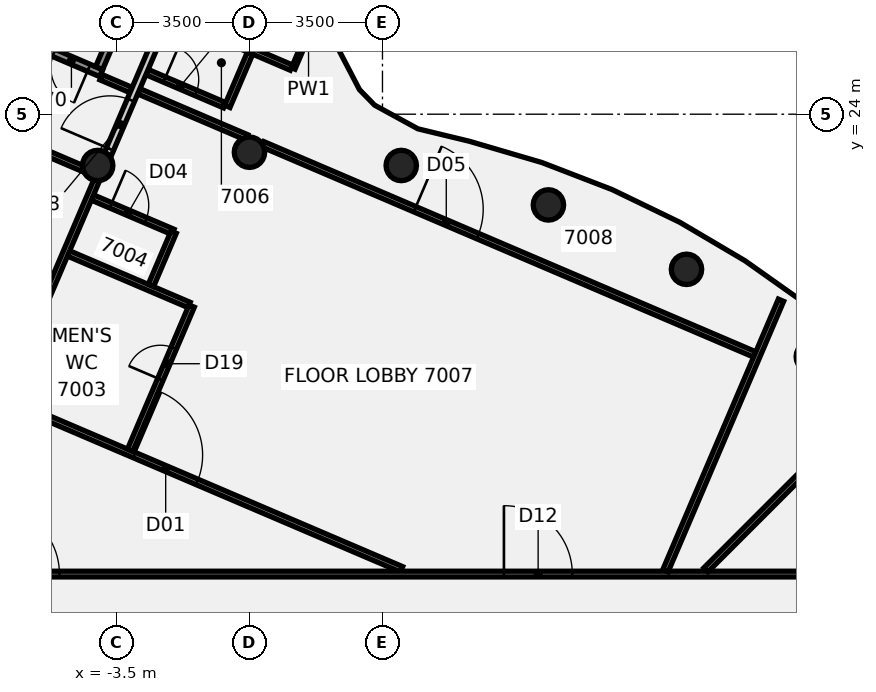
"""IFC4 building model, lengths in metres.
Left out: names, types, materials, properties, quantities, classifications, styles, units other than length and angle.
Written with IfcOpenShell. Run it as: python <this file> out.ifc"""

import sys

from ifc_helpers import new_model, si_unit, direction, frame, frame_2d, origin, origin_2d, place, context, subcontext, project, spatial, rectangle, circle, extrude, element, fill, save


model = new_model("IFC4")
c1 = context("Model", 3, precision=1e-05, world=origin(), true_north=direction((0.0, 1.0)))
c2 = subcontext(c1, "Body", "Model", "MODEL_VIEW")
j1 = project(units=[si_unit("LENGTHUNIT", "METRE"), si_unit("PLANEANGLEUNIT", "RADIAN")], contexts=[c1])
p1 = place(None, origin())
s1 = spatial("IfcSite", under=j1, at=p1, CompositionType="ELEMENT")
p2 = place(p1, origin())
s2 = spatial("IfcBuilding", under=s1, at=p2, CompositionType="ELEMENT")
p3 = place(p2, frame((0.0, 0.0, 274.8)))
s3 = spatial("IfcBuildingStorey", under=s2, at=p3, CompositionType="ELEMENT", Elevation=274.8)
for number, where, z_axis, x_axis in (
    (1, (11.5, 19.919, -0.14), (0.0, 0.0, 1.0), (1.0, 0.0, 0.0)),
    (2, (7.866, 21.613, -0.14), (0.0, 0.0, 1.0), (1.0, 0.0, 0.0)),
    (3, (3.994, 22.651, -0.14), (0.0, 0.0, 1.0), (1.0, 0.0, 0.0)),
    (4, (0.0, 23.0, -0.14), (0.0, 0.0, 1.0), (1.0, 0.0, 0.0)),
    (5, (-3.994, 22.651, -0.14), (0.0, 0.0, 1.0), (1.0, 0.0, 0.0)),
):
    element("IfcColumn", number, at=place(p3, frame(where, z_axis=z_axis, x_axis=x_axis)), inside=s3, PredefinedType="COLUMN", context=c2, shape_type="SweptSolid", body=[
        extrude(circle(Radius=0.4, at=origin_2d()), origin(), (0.0, 0.0, 1.0), 3.56),
    ])
p4 = place(p3, frame((-15.911, 20.533, 0.0), z_axis=(0.0, 0.0, 1.0), x_axis=(0.919595802133, -0.392865830405, 0.0)))
e6 = element("IfcWall", 6, at=p4, inside=s3, PredefinedType="PARTITIONING", context=c2, shape_type="SweptSolid", body=[
    extrude(rectangle(XDim=21.654, YDim=0.15, at=frame_2d((10.827, 0.0))), origin(), (0.0, 0.0, 1.0), 2.824),
])
p5 = place(p4, frame((14.005, 0.0, 0.0)))
e7 = element("IfcOpeningElement", 7, at=p5, cuts=e6, PredefinedType="OPENING", context=c2, shape_type="SweptSolid", body=[
    extrude(rectangle(XDim=1.8, YDim=2.1, at=frame_2d((0.9, 1.05))), frame((0.0, 0.085, 0.0), z_axis=(0.0, -1.0, 0.0), x_axis=(1.0, 0.0, 0.0)), (0.0, 0.0, 1.0), 0.17),
])
p6 = place(p3, frame((-12.173, 25.896, 0.0), z_axis=(0.0, 0.0, 1.0), x_axis=(0.919645111199, -0.392750390767, 0.0)))
e8 = element("IfcWall", 8, at=p6, inside=s3, PredefinedType="PARTITIONING", context=c2, shape_type="SweptSolid", body=[
    extrude(rectangle(XDim=8.472, YDim=0.15, at=frame_2d((4.236, 0.0))), origin(), (0.0, 0.0, 1.0), 2.824),
])
p7 = place(p6, frame((3.925, 0.0, 0.0)))
e9 = element("IfcOpeningElement", 9, at=p7, cuts=e8, PredefinedType="OPENING", context=c2, shape_type="SweptSolid", body=[
    extrude(rectangle(XDim=0.9, YDim=2.1, at=frame_2d((0.45, 1.05))), frame((0.0, 0.085, 0.0), z_axis=(0.0, -1.0, 0.0), x_axis=(1.0, 0.0, 0.0)), (0.0, 0.0, 1.0), 0.17),
])
p8 = place(p3, frame((-3.906, 24.973, 0.0), z_axis=(0.0, 0.0, 1.0), x_axis=(0.919526501885, -0.393028004512, 0.0)))
e10 = element("IfcWall", 10, at=p8, inside=s3, PredefinedType="PARTITIONING", context=c2, shape_type="SweptSolid", body=[
    extrude(rectangle(XDim=0.86, YDim=0.15, at=frame_2d((0.43, 0.0))), origin(), (0.0, 0.0, 1.0), 2.824),
])
p9 = place(p3, frame((-4.761, 20.336, 0.0), z_axis=(0.0, 0.0, 1.0), x_axis=(0.91960570613, -0.392842646938, 0.0)))
e11 = element("IfcWall", 11, at=p9, inside=s3, PredefinedType="PARTITIONING", context=c2, shape_type="SweptSolid", body=[
    extrude(rectangle(XDim=3.449, YDim=0.15, at=frame_2d((1.725, 0.0))), origin(), (0.0, 0.0, 1.0), 2.824),
])
p10 = place(p3, frame((-4.128, 21.807, 0.0), z_axis=(0.0, 0.0, 1.0), x_axis=(0.919556307153, -0.392958264929, 0.0)))
e12 = element("IfcWall", 12, at=p10, inside=s3, PredefinedType="PARTITIONING", context=c2, shape_type="SweptSolid", body=[
    extrude(rectangle(XDim=2.3, YDim=0.15, at=frame_2d((1.15, 0.0))), origin(), (0.0, 0.0, 1.0), 2.824),
])
p11 = place(p10, frame((0.52, 0.0, 0.0)))
e13 = element("IfcOpeningElement", 13, at=p11, cuts=e12, PredefinedType="OPENING", context=c2, shape_type="SweptSolid", body=[
    extrude(rectangle(XDim=1.0, YDim=2.1, at=frame_2d((0.5, 1.05))), frame((0.0, 0.085, 0.0), z_axis=(0.0, -1.0, 0.0), x_axis=(1.0, 0.0, 0.0)), (0.0, 0.0, 1.0), 0.17),
])
p12 = place(p3, frame((-2.911, 24.603, 0.0), z_axis=(0.0, 0.0, 1.0), x_axis=(0.919582336427, -0.392897348593, 0.0)))
e14 = element("IfcWall", 14, at=p12, inside=s3, PredefinedType="PARTITIONING", context=c2, shape_type="SweptSolid", body=[
    extrude(rectangle(XDim=3.086, YDim=0.15, at=frame_2d((1.543, 0.0))), origin(), (0.0, 0.0, 1.0), 2.824),
])
p13 = place(p3, frame((0.351, 23.209, 0.0), z_axis=(0.0, 0.0, 1.0), x_axis=(0.919588500122, -0.392882922056, 0.0)))
e15 = element("IfcWall", 15, at=p13, inside=s3, PredefinedType="PARTITIONING", context=c2, shape_type="SweptSolid", body=[
    extrude(rectangle(XDim=14.077, YDim=0.15, at=frame_2d((7.038, 0.0))), origin(), (0.0, 0.0, 1.0), 2.824),
])
p14 = place(p13, frame((4.35, 0.0, 0.0)))
e16 = element("IfcOpeningElement", 16, at=p14, cuts=e15, PredefinedType="OPENING", context=c2, shape_type="SweptSolid", body=[
    extrude(rectangle(XDim=1.8, YDim=2.1, at=frame_2d((0.9, 1.05))), frame((0.0, 0.085, 0.0), z_axis=(0.0, -1.0, 0.0), x_axis=(1.0, 0.0, 0.0)), (0.0, 0.0, 1.0), 0.17),
])
p15 = place(p3, frame((-2.695, 25.109, 0.0), z_axis=(0.0, 0.0, 1.0), x_axis=(0.919571099673, -0.392923647349, 0.0)))
e17 = element("IfcWall", 17, at=p15, inside=s3, PredefinedType="PARTITIONING", context=c2, shape_type="SweptSolid", body=[
    extrude(rectangle(XDim=2.22, YDim=0.15, at=frame_2d((1.11, 0.0))), origin(), (0.0, 0.0, 1.0), 2.824),
])
p16 = place(p15, frame((0.5, 0.0, 0.0)))
e18 = element("IfcOpeningElement", 18, at=p16, cuts=e17, PredefinedType="OPENING", context=c2, shape_type="SweptSolid", body=[
    extrude(rectangle(XDim=0.9, YDim=2.1, at=frame_2d((0.45, 1.05))), frame((0.0, 0.085, 0.0), z_axis=(0.0, -1.0, 0.0), x_axis=(1.0, 0.0, 0.0)), (0.0, 0.0, 1.0), 0.17),
])
p17 = place(p3, frame((-2.062, 26.579, 0.0), z_axis=(0.0, 0.0, 1.0), x_axis=(0.919588532032, -0.392882847366, 0.0)))
e19 = element("IfcWall", 19, at=p17, inside=s3, PredefinedType="PARTITIONING", context=c2, shape_type="SweptSolid", body=[
    extrude(rectangle(XDim=3.441, YDim=0.15, at=frame_2d((1.72, 0.0))), origin(), (0.0, 0.0, 1.0), 2.824),
])
p18 = place(p3, frame((-17.065, 11.9, 0.0), z_axis=(0.0, 0.0, 1.0), x_axis=(1.0, 0.0, 0.0)))
e20 = element("IfcWall", 20, at=p18, inside=s3, PredefinedType="PARTITIONING", context=c2, shape_type="SweptSolid", body=[
    extrude(rectangle(XDim=34.165, YDim=0.15, at=frame_2d((17.083, 0.0))), origin(), (0.0, 0.0, 1.0), 2.824),
])
p19 = place(p18, frame((23.761, 0.0, 0.0)))
e21 = element("IfcOpeningElement", 21, at=p19, cuts=e20, PredefinedType="OPENING", context=c2, shape_type="SweptSolid", body=[
    extrude(rectangle(XDim=1.8, YDim=2.1, at=frame_2d((0.9, 1.05))), frame((0.0, 0.085, 0.0), z_axis=(0.0, -1.0, 0.0), x_axis=(1.0, 0.0, 0.0)), (0.0, 0.0, 1.0), 0.17),
])
p20 = place(p18, frame((1.615, 0.0, 0.0)))
e22 = element("IfcOpeningElement", 22, at=p20, cuts=e20, PredefinedType="OPENING", context=c2, shape_type="SweptSolid", body=[
    extrude(rectangle(XDim=0.9, YDim=2.1, at=frame_2d((0.45, 1.05))), frame((0.0, 0.085, 0.0), z_axis=(0.0, -1.0, 0.0), x_axis=(1.0, 0.0, 0.0)), (0.0, 0.0, 1.0), 0.17),
])
p21 = place(p18, frame((31.665, 0.0, 0.0)))
e23 = element("IfcOpeningElement", 23, at=p21, cuts=e20, PredefinedType="OPENING", context=c2, shape_type="SweptSolid", body=[
    extrude(rectangle(XDim=0.9, YDim=2.1, at=frame_2d((0.45, 1.05))), frame((0.0, 0.085, 0.0), z_axis=(0.0, -1.0, 0.0), x_axis=(1.0, 0.0, 0.0)), (0.0, 0.0, 1.0), 0.17),
])
p22 = place(p18, frame((10.265, 0.0, 0.0)))
e24 = element("IfcOpeningElement", 24, at=p22, cuts=e20, PredefinedType="OPENING", context=c2, shape_type="SweptSolid", body=[
    extrude(rectangle(XDim=1.8, YDim=2.1, at=frame_2d((0.9, 1.05))), frame((0.0, 0.085, 0.0), z_axis=(0.0, -1.0, 0.0), x_axis=(1.0, 0.0, 0.0)), (0.0, 0.0, 1.0), 0.17),
])
p23 = place(p3, frame((12.01, 12.01, 0.0), z_axis=(0.0, 0.0, 1.0), x_axis=(0.707106781187, 0.707106781187, 0.0)))
e25 = element("IfcWall", 25, at=p23, inside=s3, PredefinedType="PARTITIONING", context=c2, shape_type="SweptSolid", body=[
    extrude(rectangle(XDim=6.691, YDim=0.15, at=frame_2d((3.345, 0.0))), origin(), (0.0, 0.0, 1.0), 2.824),
])
p24 = place(p3, frame((-6.45, 16.573, 0.0), z_axis=(0.0, 0.0, 1.0), x_axis=(0.392889649243, 0.919585625985, 0.0)))
e26 = element("IfcWall", 26, at=p24, inside=s3, PredefinedType="PARTITIONING", context=c2, shape_type="SweptSolid", body=[
    extrude(rectangle(XDim=6.326, YDim=0.15, at=frame_2d((3.163, 0.0))), origin(), (0.0, 0.0, 1.0), 2.824),
])
p25 = place(p3, frame((-3.788, 22.804, 0.0), z_axis=(0.0, 0.0, 1.0), x_axis=(0.392862746148, 0.91959711977, 0.0)))
e27 = element("IfcWall", 27, at=p25, inside=s3, PredefinedType="PARTITIONING", context=c2, shape_type="SweptSolid", body=[
    extrude(rectangle(XDim=7.448, YDim=0.2, at=frame_2d((3.724, 0.0))), origin(), (0.0, 0.0, 1.0), 2.824),
])
p26 = place(p25, frame((0.303, 0.0, 0.0)))
e28 = element("IfcOpeningElement", 28, at=p26, cuts=e27, PredefinedType="OPENING", context=c2, shape_type="SweptSolid", body=[
    extrude(rectangle(XDim=1.4, YDim=2.1, at=frame_2d((0.7, 1.05))), frame((0.0, 0.11, 0.0), z_axis=(0.0, -1.0, 0.0), x_axis=(1.0, 0.0, 0.0)), (0.0, 0.0, 1.0), 0.22),
])
p27 = place(p3, frame((-3.14, 15.159, 0.0), z_axis=(0.0, 0.0, 1.0), x_axis=(0.392854606295, 0.919600597168, 0.0)))
e29 = element("IfcWall", 29, at=p27, inside=s3, PredefinedType="PARTITIONING", context=c2, shape_type="SweptSolid", body=[
    extrude(rectangle(XDim=4.125, YDim=0.15, at=frame_2d((2.062, 0.0))), origin(), (0.0, 0.0, 1.0), 2.824),
])
p28 = place(p27, frame((2.025, 0.0, 0.0)))
e30 = element("IfcOpeningElement", 30, at=p28, cuts=e29, PredefinedType="OPENING", context=c2, shape_type="SweptSolid", body=[
    extrude(rectangle(XDim=0.9, YDim=2.1, at=frame_2d((0.45, 1.05))), frame((0.0, 0.085, 0.0), z_axis=(0.0, -1.0, 0.0), x_axis=(1.0, 0.0, 0.0)), (0.0, 0.0, 1.0), 0.17),
])
p29 = place(p3, frame((1.152, 25.205, 0.0), z_axis=(0.0, 0.0, 1.0), x_axis=(0.392869839525, 0.919594089363, 0.0)))
e31 = element("IfcWall", 31, at=p29, inside=s3, PredefinedType="PARTITIONING", context=c2, shape_type="SweptSolid", body=[
    extrude(rectangle(XDim=2.05, YDim=0.1, at=frame_2d((1.025, 0.0))), origin(), (0.0, 0.0, 1.0), 2.824),
])
p30 = place(p29, frame((0.45, 0.0, 0.0)))
e32 = element("IfcOpeningElement", 32, at=p30, cuts=e31, PredefinedType="OPENING", context=c2, shape_type="SweptSolid", body=[
    extrude(rectangle(XDim=0.9, YDim=2.1, at=frame_2d((0.45, 1.05))), frame((0.0, 0.06, 0.0), z_axis=(0.0, -1.0, 0.0), x_axis=(1.0, 0.0, 0.0)), (0.0, 0.0, 1.0), 0.12),
])
p31 = place(p3, frame((-2.592, 19.497, 0.0), z_axis=(0.0, 0.0, 1.0), x_axis=(0.39231007283, 0.919833031999, 0.0)))
e33 = element("IfcWall", 33, at=p31, inside=s3, PredefinedType="PARTITIONING", context=c2, shape_type="SweptSolid", body=[
    extrude(rectangle(XDim=1.52, YDim=0.15, at=frame_2d((0.76, 0.0))), origin(), (0.0, 0.0, 1.0), 2.824),
])
p32 = place(p3, frame((-0.583, 24.206, 0.0), z_axis=(0.0, 0.0, 1.0), x_axis=(0.392489240169, 0.919756596253, 0.0)))
e34 = element("IfcWall", 34, at=p32, inside=s3, PredefinedType="PARTITIONING", context=c2, shape_type="SweptSolid", body=[
    extrude(rectangle(XDim=1.525, YDim=0.15, at=frame_2d((0.763, 0.0))), origin(), (0.0, 0.0, 1.0), 2.824),
])
p33 = place(p3, frame((10.946, 11.987, 0.0), z_axis=(0.0, 0.0, 1.0), x_axis=(0.392849254325, 0.919602883519, 0.0)))
e35 = element("IfcWall", 35, at=p33, inside=s3, PredefinedType="PARTITIONING", context=c2, shape_type="SweptSolid", body=[
    extrude(rectangle(XDim=7.74, YDim=0.15, at=frame_2d((3.87, 0.0))), origin(), (0.0, 0.0, 1.0), 2.824),
])
p34 = place(p3, frame((-3.903, 25.081, -0.14), z_axis=(0.0, 0.0, 1.0), x_axis=(-0.919604285577, 0.392845972295, 0.0)))
e36 = element("IfcWall", 36, at=p34, inside=s3, PredefinedType="SHEAR", context=c2, shape_type="SweptSolid", body=[
    extrude(rectangle(XDim=6.7, YDim=0.2, at=frame_2d((3.35, 0.0))), origin(), (0.0, 0.0, 1.0), 3.064),
])
p35 = place(p34, frame((0.35, 0.0, 0.0)))
e37 = element("IfcOpeningElement", 37, at=p35, cuts=e36, PredefinedType="OPENING", context=c2, shape_type="SweptSolid", body=[
    extrude(rectangle(XDim=1.0, YDim=2.1, at=frame_2d((0.5, 1.05))), frame((0.0, 0.11, 0.0), z_axis=(0.0, -1.0, 0.0), x_axis=(1.0, 0.0, 0.0)), (0.0, 0.0, 1.0), 0.22),
])
p36 = place(p3, frame((-2.699, 28.155, -0.14), z_axis=(0.0, 0.0, 1.0), x_axis=(-0.392823319404, -0.919613962341, 0.0)))
e38 = element("IfcWall", 38, at=p36, inside=s3, PredefinedType="SHEAR", context=c2, shape_type="SweptSolid", body=[
    extrude(rectangle(XDim=3.2, YDim=0.2, at=frame_2d((1.6, 0.0))), origin(), (0.0, 0.0, 1.0), 3.56),
])
p37 = place(p5, origin())
e39 = element("IfcDoor", 39, at=p37, inside=s3, OperationType="DOUBLE_DOOR_SINGLE_SWING", PredefinedType="DOOR", context=c2, shape_type="SweptSolid", body=[
    extrude(rectangle(XDim=1.8, YDim=2.1, at=frame_2d((0.9, 1.05))), frame((0.0, 0.025, 0.0), z_axis=(0.0, -1.0, 0.0), x_axis=(1.0, 0.0, 0.0)), (0.0, 0.0, 1.0), 0.05),
])
fill(e7, e39)
p38 = place(p11, frame((1.0, 0.0, 0.0), z_axis=(0.0, 0.0, 1.0), x_axis=(-1.0, 0.0, 0.0)))
e40 = element("IfcDoor", 40, at=p38, inside=s3, OperationType="SINGLE_SWING_LEFT", PredefinedType="DOOR", context=c2, shape_type="SweptSolid", body=[
    extrude(rectangle(XDim=1.0, YDim=2.1, at=frame_2d((0.5, 1.05))), frame((0.0, 0.025, 0.0), z_axis=(0.0, -1.0, 0.0), x_axis=(1.0, 0.0, 0.0)), (0.0, 0.0, 1.0), 0.05),
])
fill(e13, e40)
p39 = place(p14, origin())
e41 = element("IfcDoor", 41, at=p39, inside=s3, OperationType="DOUBLE_DOOR_SINGLE_SWING", PredefinedType="DOOR", context=c2, shape_type="SweptSolid", body=[
    extrude(rectangle(XDim=1.8, YDim=2.1, at=frame_2d((0.9, 1.05))), frame((0.0, 0.025, 0.0), z_axis=(0.0, -1.0, 0.0), x_axis=(1.0, 0.0, 0.0)), (0.0, 0.0, 1.0), 0.05),
])
fill(e16, e41)
p40 = place(p16, origin())
e42 = element("IfcDoor", 42, at=p40, inside=s3, OperationType="SINGLE_SWING_RIGHT", PredefinedType="DOOR", context=c2, shape_type="SweptSolid", body=[
    extrude(rectangle(XDim=0.9, YDim=2.1, at=frame_2d((0.45, 1.05))), frame((0.0, 0.025, 0.0), z_axis=(0.0, -1.0, 0.0), x_axis=(1.0, 0.0, 0.0)), (0.0, 0.0, 1.0), 0.05),
])
fill(e18, e42)
p41 = place(p19, frame((1.8, 0.0, 0.0), z_axis=(0.0, 0.0, 1.0), x_axis=(-1.0, 0.0, 0.0)))
e43 = element("IfcDoor", 43, at=p41, inside=s3, OperationType="DOUBLE_DOOR_SINGLE_SWING", PredefinedType="DOOR", context=c2, shape_type="SweptSolid", body=[
    extrude(rectangle(XDim=1.8, YDim=2.1, at=frame_2d((0.9, 1.05))), frame((0.0, 0.025, 0.0), z_axis=(0.0, -1.0, 0.0), x_axis=(1.0, 0.0, 0.0)), (0.0, 0.0, 1.0), 0.05),
])
fill(e21, e43)
p42 = place(p22, frame((1.8, 0.0, 0.0), z_axis=(0.0, 0.0, 1.0), x_axis=(-1.0, 0.0, 0.0)))
e44 = element("IfcDoor", 44, at=p42, inside=s3, OperationType="DOUBLE_DOOR_SINGLE_SWING", PredefinedType="DOOR", context=c2, shape_type="SweptSolid", body=[
    extrude(rectangle(XDim=1.8, YDim=2.1, at=frame_2d((0.9, 1.05))), frame((0.0, 0.025, 0.0), z_axis=(0.0, -1.0, 0.0), x_axis=(1.0, 0.0, 0.0)), (0.0, 0.0, 1.0), 0.05),
])
fill(e24, e44)
p43 = place(p26, frame((1.4, 0.0, 0.0), z_axis=(0.0, 0.0, 1.0), x_axis=(-1.0, 0.0, 0.0)))
e45 = element("IfcDoor", 45, at=p43, inside=s3, OperationType="DOUBLE_DOOR_SINGLE_SWING", PredefinedType="DOOR", context=c2, shape_type="SweptSolid", body=[
    extrude(rectangle(XDim=1.4, YDim=2.1, at=frame_2d((0.7, 1.05))), frame((0.0, 0.025, 0.0), z_axis=(0.0, -1.0, 0.0), x_axis=(1.0, 0.0, 0.0)), (0.0, 0.0, 1.0), 0.05),
])
fill(e28, e45)
p44 = place(p28, origin())
e46 = element("IfcDoor", 46, at=p44, inside=s3, OperationType="SINGLE_SWING_LEFT", PredefinedType="DOOR", context=c2, shape_type="SweptSolid", body=[
    extrude(rectangle(XDim=0.9, YDim=2.1, at=frame_2d((0.45, 1.05))), frame((0.0, 0.025, 0.0), z_axis=(0.0, -1.0, 0.0), x_axis=(1.0, 0.0, 0.0)), (0.0, 0.0, 1.0), 0.05),
])
fill(e30, e46)
p45 = place(p30, origin())
e47 = element("IfcDoor", 47, at=p45, inside=s3, OperationType="SINGLE_SWING_RIGHT", PredefinedType="DOOR", context=c2, shape_type="SweptSolid", body=[
    extrude(rectangle(XDim=0.9, YDim=2.1, at=frame_2d((0.45, 1.05))), frame((0.0, 0.025, 0.0), z_axis=(0.0, -1.0, 0.0), x_axis=(1.0, 0.0, 0.0)), (0.0, 0.0, 1.0), 0.05),
])
fill(e32, e47)
p46 = place(p35, origin())
e48 = element("IfcDoor", 48, at=p46, inside=s3, OperationType="SINGLE_SWING_LEFT", PredefinedType="DOOR", context=c2, shape_type="SweptSolid", body=[
    extrude(rectangle(XDim=1.0, YDim=2.1, at=frame_2d((0.5, 1.05))), frame((0.0, 0.025, 0.0), z_axis=(0.0, -1.0, 0.0), x_axis=(1.0, 0.0, 0.0)), (0.0, 0.0, 1.0), 0.05),
])
fill(e37, e48)
save(model, sys.argv[1])
